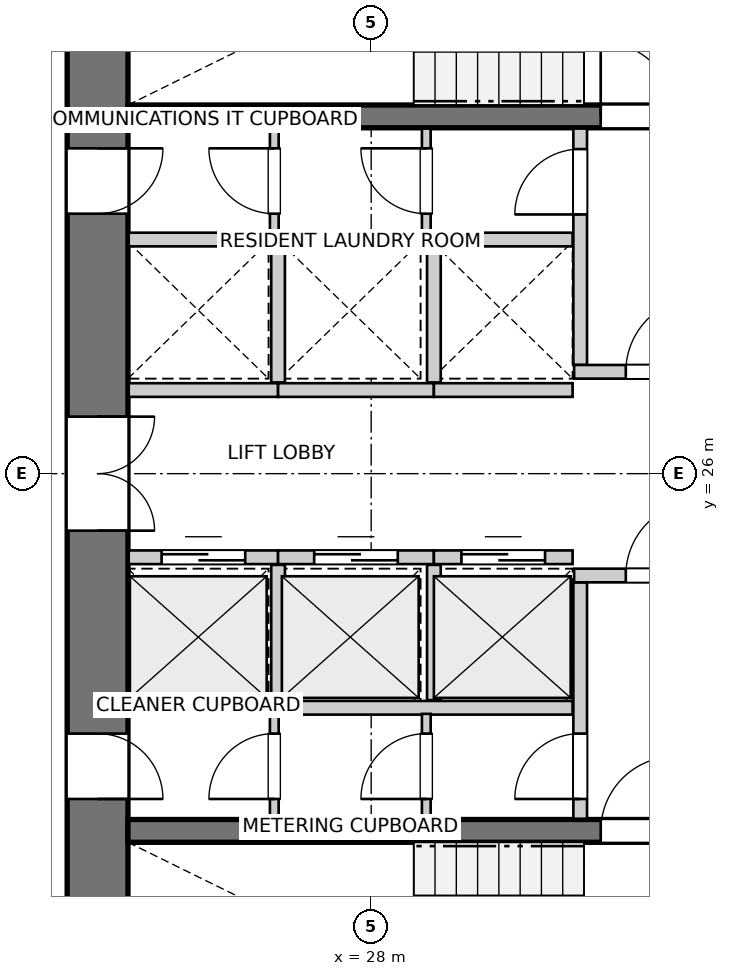
"""IFC4 building model, lengths in metres.
Left out: names, types, materials, properties, quantities, classifications, styles, units other than length and angle.
Written with IfcOpenShell. Run it as: python <this file> out.ifc"""

import sys

from ifc_helpers import new_model, si_unit, direction, frame, frame_2d, origin, place, context, subcontext, project, spatial, rectangle, extrude, source, transform, mapped, element, fill, save


model = new_model("IFC4")
c1 = context("Model", 3, precision=1e-05, world=origin(), true_north=direction((0.0, 1.0)))
c2 = subcontext(c1, "Body", "Model", "MODEL_VIEW")
j1 = project(units=[si_unit("LENGTHUNIT", "METRE"), si_unit("PLANEANGLEUNIT", "RADIAN")], contexts=[c1])
p1 = place(None, origin())
s1 = spatial("IfcSite", under=j1, at=p1, CompositionType="ELEMENT")
p2 = place(p1, origin())
s2 = spatial("IfcBuilding", under=s1, at=p2, CompositionType="ELEMENT")
p3 = place(p2, frame((0.0, 0.0, 62.2)))
s3 = spatial("IfcBuildingStorey", under=s2, at=p3, CompositionType="ELEMENT", Elevation=62.2)
p4 = place(p3, frame((24.4, 33.8, 0.0), z_axis=(0.0, 0.0, 1.0), x_axis=(0.0, -1.0, 0.0)))
e1 = element("IfcWall", 1, at=p4, inside=s3, PredefinedType="SHEAR", context=c2, shape_type="SweptSolid", body=[
    extrude(rectangle(XDim=15.6, YDim=0.8, at=frame_2d((7.8, 0.0))), origin(), (0.0, 0.0, 1.0), 2.9),
])
p5 = place(p4, frame((7.05, 0.0, 0.0)))
e2 = element("IfcOpeningElement", 2, at=p5, cuts=e1, PredefinedType="OPENING", context=c2, shape_type="SweptSolid", body=[
    extrude(rectangle(XDim=1.5, YDim=2.15, at=frame_2d((0.75, 1.075))), frame((0.0, 0.41, 0.0), z_axis=(0.0, -1.0, 0.0), x_axis=(1.0, 0.0, 0.0)), (0.0, 0.0, 1.0), 0.82),
])
p6 = place(p4, frame((3.52, 0.0, 0.0)))
e3 = element("IfcOpeningElement", 3, at=p6, cuts=e1, PredefinedType="OPENING", context=c2, shape_type="SweptSolid", body=[
    extrude(rectangle(XDim=0.86, YDim=2.05, at=frame_2d((0.43, 1.025))), frame((0.0, 0.41, 0.0), z_axis=(0.0, -1.0, 0.0), x_axis=(1.0, 0.0, 0.0)), (0.0, 0.0, 1.0), 0.82),
])
p7 = place(p4, frame((11.22, 0.0, 0.0)))
e4 = element("IfcOpeningElement", 4, at=p7, cuts=e1, PredefinedType="OPENING", context=c2, shape_type="SweptSolid", body=[
    extrude(rectangle(XDim=0.86, YDim=2.05, at=frame_2d((0.43, 1.025))), frame((0.0, 0.41, 0.0), z_axis=(0.0, -1.0, 0.0), x_axis=(1.0, 0.0, 0.0)), (0.0, 0.0, 1.0), 0.82),
])
p8 = place(p3, frame((24.8, 21.3, 0.0), z_axis=(0.0, 0.0, 1.0), x_axis=(1.0, 0.0, 0.0)))
e5 = element("IfcWall", 5, at=p8, inside=s3, PredefinedType="SHEAR", context=c2, shape_type="SweptSolid", body=[
    extrude(rectangle(XDim=11.1, YDim=0.3, at=frame_2d((5.55, 0.0))), origin(), (0.0, 0.0, 1.0), 2.9),
])
p9 = place(p8, frame((6.22, 0.0, 0.0)))
e6 = element("IfcOpeningElement", 6, at=p9, cuts=e5, PredefinedType="OPENING", context=c2, shape_type="SweptSolid", body=[
    extrude(rectangle(XDim=0.98, YDim=2.15, at=frame_2d((0.49, 1.075))), frame((0.0, 0.16, 0.0), z_axis=(0.0, -1.0, 0.0), x_axis=(1.0, 0.0, 0.0)), (0.0, 0.0, 1.0), 0.32),
])
p10 = place(p8, frame((9.15, 0.0, 0.0)))
e7 = element("IfcOpeningElement", 7, at=p10, cuts=e5, PredefinedType="OPENING", context=c2, shape_type="SweptSolid", body=[
    extrude(rectangle(XDim=1.15, YDim=2.15, at=frame_2d((0.575, 1.075))), frame((0.0, 0.16, 0.0), z_axis=(0.0, -1.0, 0.0), x_axis=(1.0, 0.0, 0.0)), (0.0, 0.0, 1.0), 0.32),
])
p11 = place(p3, frame((24.8, 30.7, 0.0), z_axis=(0.0, 0.0, 1.0), x_axis=(1.0, 0.0, 0.0)))
e8 = element("IfcWall", 8, at=p11, inside=s3, PredefinedType="SHEAR", context=c2, shape_type="SweptSolid", body=[
    extrude(rectangle(XDim=11.1, YDim=0.3, at=frame_2d((5.55, 0.0))), origin(), (0.0, 0.0, 1.0), 2.9),
])
p12 = place(p11, frame((6.22, 0.0, 0.0)))
e9 = element("IfcOpeningElement", 9, at=p12, cuts=e8, PredefinedType="OPENING", context=c2, shape_type="SweptSolid", body=[
    extrude(rectangle(XDim=0.98, YDim=2.15, at=frame_2d((0.49, 1.075))), frame((0.0, 0.16, 0.0), z_axis=(0.0, -1.0, 0.0), x_axis=(1.0, 0.0, 0.0)), (0.0, 0.0, 1.0), 0.32),
])
p13 = place(p11, frame((9.15, 0.0, 0.0)))
e10 = element("IfcOpeningElement", 10, at=p13, cuts=e8, PredefinedType="OPENING", context=c2, shape_type="SweptSolid", body=[
    extrude(rectangle(XDim=1.15, YDim=2.15, at=frame_2d((0.575, 1.075))), frame((0.0, 0.16, 0.0), z_axis=(0.0, -1.0, 0.0), x_axis=(1.0, 0.0, 0.0)), (0.0, 0.0, 1.0), 0.32),
])
p14 = place(p3, frame((30.75, 21.46, 0.0), z_axis=(0.0, 0.0, 1.0), x_axis=(0.0, 1.0, 0.0)))
e11 = element("IfcWall", 11, at=p14, inside=s3, PredefinedType="PARTITIONING", context=c2, shape_type="SweptSolid", body=[
    extrude(rectangle(XDim=3.11, YDim=0.18, at=frame_2d((1.555, 0.0))), origin(), (0.0, 0.0, 1.0), 2.9),
])
p15 = place(p14, frame((0.26, 0.0, 0.0)))
e12 = element("IfcOpeningElement", 12, at=p15, cuts=e11, PredefinedType="OPENING", context=c2, shape_type="SweptSolid", body=[
    extrude(rectangle(XDim=0.86, YDim=2.05, at=frame_2d((0.43, 1.025))), frame((0.0, 0.1, 0.0), z_axis=(0.0, -1.0, 0.0), x_axis=(1.0, 0.0, 0.0)), (0.0, 0.0, 1.0), 0.2),
])
p16 = place(p3, frame((30.67, 24.66, 0.0), z_axis=(0.0, 0.0, 1.0), x_axis=(1.0, 0.0, 0.0)))
e13 = element("IfcWall", 13, at=p16, inside=s3, PredefinedType="PARTITIONING", context=c2, shape_type="SweptSolid", body=[
    extrude(rectangle(XDim=5.22, YDim=0.18, at=frame_2d((2.61, 0.0))), origin(), (0.0, 0.0, 1.0), 2.9),
])
p17 = place(p16, frame((0.68, 0.0, 0.0)))
e14 = element("IfcOpeningElement", 14, at=p17, cuts=e13, PredefinedType="OPENING", context=c2, shape_type="SweptSolid", body=[
    extrude(rectangle(XDim=0.98, YDim=2.15, at=frame_2d((0.49, 1.075))), frame((0.0, 0.1, 0.0), z_axis=(0.0, -1.0, 0.0), x_axis=(1.0, 0.0, 0.0)), (0.0, 0.0, 1.0), 0.2),
])
p18 = place(p3, frame((30.75, 27.43, 0.0), z_axis=(0.0, 0.0, 1.0), x_axis=(0.0, 1.0, 0.0)))
e15 = element("IfcWall", 15, at=p18, inside=s3, PredefinedType="PARTITIONING", context=c2, shape_type="SweptSolid", body=[
    extrude(rectangle(XDim=3.11, YDim=0.18, at=frame_2d((1.555, 0.0))), origin(), (0.0, 0.0, 1.0), 2.9),
])
p19 = place(p18, frame((1.98, 0.0, 0.0)))
e16 = element("IfcOpeningElement", 16, at=p19, cuts=e15, PredefinedType="OPENING", context=c2, shape_type="SweptSolid", body=[
    extrude(rectangle(XDim=0.86, YDim=2.05, at=frame_2d((0.43, 1.025))), frame((0.0, 0.1, 0.0), z_axis=(0.0, -1.0, 0.0), x_axis=(1.0, 0.0, 0.0)), (0.0, 0.0, 1.0), 0.2),
])
p20 = place(p3, frame((30.67, 27.34, 0.0), z_axis=(0.0, 0.0, 1.0), x_axis=(1.0, 0.0, 0.0)))
e17 = element("IfcWall", 17, at=p20, inside=s3, PredefinedType="PARTITIONING", context=c2, shape_type="SweptSolid", body=[
    extrude(rectangle(XDim=5.22, YDim=0.18, at=frame_2d((2.61, 0.0))), origin(), (0.0, 0.0, 1.0), 2.9),
])
p21 = place(p20, frame((0.68, 0.0, 0.0)))
e18 = element("IfcOpeningElement", 18, at=p21, cuts=e17, PredefinedType="OPENING", context=c2, shape_type="SweptSolid", body=[
    extrude(rectangle(XDim=0.98, YDim=2.15, at=frame_2d((0.49, 1.075))), frame((0.0, 0.1, 0.0), z_axis=(0.0, -1.0, 0.0), x_axis=(1.0, 0.0, 0.0)), (0.0, 0.0, 1.0), 0.2),
])
p22 = place(p3, frame((24.81, 22.92, 0.0), z_axis=(0.0, 0.0, 1.0), x_axis=(1.0, 0.0, 0.0)))
e19 = element("IfcWall", 19, at=p22, inside=s3, PredefinedType="PARTITIONING", context=c2, shape_type="SweptSolid", body=[
    extrude(rectangle(XDim=5.84, YDim=0.18, at=frame_2d((2.92, 0.0))), origin(), (0.0, 0.0, 1.0), 2.9),
])
p23 = place(p3, frame((24.81, 24.9, 0.0), z_axis=(0.0, 0.0, 1.0), x_axis=(1.0, 0.0, 0.0)))
e20 = element("IfcWall", 20, at=p23, inside=s3, PredefinedType="PARTITIONING", context=c2, shape_type="SweptSolid", body=[
    extrude(rectangle(XDim=1.965, YDim=0.18, at=frame_2d((0.982, 0.0))), origin(), (0.0, 0.0, 1.0), 2.9),
])
p24 = place(p23, frame((0.433, 0.0, 0.0)))
e21 = element("IfcOpeningElement", 21, at=p24, cuts=e20, PredefinedType="OPENING", context=c2, shape_type="SweptSolid", body=[
    extrude(rectangle(XDim=1.1, YDim=2.15, at=frame_2d((0.55, 1.075))), frame((0.0, 0.1, 0.0), z_axis=(0.0, -1.0, 0.0), x_axis=(1.0, 0.0, 0.0)), (0.0, 0.0, 1.0), 0.2),
])
p25 = place(p3, frame((26.775, 24.9, 0.0), z_axis=(0.0, 0.0, 1.0), x_axis=(1.0, 0.0, 0.0)))
e22 = element("IfcWall", 22, at=p25, inside=s3, PredefinedType="PARTITIONING", context=c2, shape_type="SweptSolid", body=[
    extrude(rectangle(XDim=2.05, YDim=0.18, at=frame_2d((1.025, 0.0))), origin(), (0.0, 0.0, 1.0), 2.9),
])
p26 = place(p25, frame((0.475, 0.0, 0.0)))
e23 = element("IfcOpeningElement", 23, at=p26, cuts=e22, PredefinedType="OPENING", context=c2, shape_type="SweptSolid", body=[
    extrude(rectangle(XDim=1.1, YDim=2.15, at=frame_2d((0.55, 1.075))), frame((0.0, 0.1, 0.0), z_axis=(0.0, -1.0, 0.0), x_axis=(1.0, 0.0, 0.0)), (0.0, 0.0, 1.0), 0.2),
])
p27 = place(p3, frame((26.775, 23.02, 0.0), z_axis=(0.0, 0.0, 1.0), x_axis=(0.0, 1.0, 0.0)))
e24 = element("IfcWall", 24, at=p27, inside=s3, PredefinedType="PARTITIONING", context=c2, shape_type="SweptSolid", body=[
    extrude(rectangle(XDim=1.78, YDim=0.18, at=frame_2d((0.89, 0.0))), origin(), (0.0, 0.0, 1.0), 2.9),
])
p28 = place(p3, frame((28.825, 24.9, 0.0), z_axis=(0.0, 0.0, 1.0), x_axis=(1.0, 0.0, 0.0)))
e25 = element("IfcWall", 25, at=p28, inside=s3, PredefinedType="PARTITIONING", context=c2, shape_type="SweptSolid", body=[
    extrude(rectangle(XDim=1.825, YDim=0.18, at=frame_2d((0.913, 0.0))), origin(), (0.0, 0.0, 1.0), 2.9),
])
p29 = place(p28, frame((0.363, 0.0, 0.0)))
e26 = element("IfcOpeningElement", 26, at=p29, cuts=e25, PredefinedType="OPENING", context=c2, shape_type="SweptSolid", body=[
    extrude(rectangle(XDim=1.1, YDim=2.15, at=frame_2d((0.55, 1.075))), frame((0.0, 0.1, 0.0), z_axis=(0.0, -1.0, 0.0), x_axis=(1.0, 0.0, 0.0)), (0.0, 0.0, 1.0), 0.2),
])
p30 = place(p3, frame((28.825, 23.02, 0.0), z_axis=(0.0, 0.0, 1.0), x_axis=(0.0, 1.0, 0.0)))
e27 = element("IfcWall", 27, at=p30, inside=s3, PredefinedType="PARTITIONING", context=c2, shape_type="SweptSolid", body=[
    extrude(rectangle(XDim=1.78, YDim=0.18, at=frame_2d((0.89, 0.0))), origin(), (0.0, 0.0, 1.0), 2.9),
])
p31 = place(p3, frame((24.81, 29.08, 0.0), z_axis=(0.0, 0.0, 1.0), x_axis=(1.0, 0.0, 0.0)))
e28 = element("IfcWall", 28, at=p31, inside=s3, PredefinedType="PARTITIONING", context=c2, shape_type="SweptSolid", body=[
    extrude(rectangle(XDim=5.84, YDim=0.18, at=frame_2d((2.92, 0.0))), origin(), (0.0, 0.0, 1.0), 2.9),
])
p32 = place(p3, frame((24.81, 27.1, 0.0), z_axis=(0.0, 0.0, 1.0), x_axis=(1.0, 0.0, 0.0)))
e29 = element("IfcWall", 29, at=p32, inside=s3, PredefinedType="PARTITIONING", context=c2, shape_type="SweptSolid", body=[
    extrude(rectangle(XDim=1.965, YDim=0.18, at=frame_2d((0.982, 0.0))), origin(), (0.0, 0.0, 1.0), 2.9),
])
p33 = place(p3, frame((26.775, 27.1, 0.0), z_axis=(0.0, 0.0, 1.0), x_axis=(1.0, 0.0, 0.0)))
e30 = element("IfcWall", 30, at=p33, inside=s3, PredefinedType="PARTITIONING", context=c2, shape_type="SweptSolid", body=[
    extrude(rectangle(XDim=2.05, YDim=0.18, at=frame_2d((1.025, 0.0))), origin(), (0.0, 0.0, 1.0), 2.9),
])
p34 = place(p3, frame((26.775, 27.2, 0.0), z_axis=(0.0, 0.0, 1.0), x_axis=(0.0, 1.0, 0.0)))
e31 = element("IfcWall", 31, at=p34, inside=s3, PredefinedType="PARTITIONING", context=c2, shape_type="SweptSolid", body=[
    extrude(rectangle(XDim=1.78, YDim=0.18, at=frame_2d((0.89, 0.0))), origin(), (0.0, 0.0, 1.0), 2.9),
])
p35 = place(p3, frame((28.825, 27.1, 0.0), z_axis=(0.0, 0.0, 1.0), x_axis=(1.0, 0.0, 0.0)))
e32 = element("IfcWall", 32, at=p35, inside=s3, PredefinedType="PARTITIONING", context=c2, shape_type="SweptSolid", body=[
    extrude(rectangle(XDim=1.825, YDim=0.18, at=frame_2d((0.913, 0.0))), origin(), (0.0, 0.0, 1.0), 2.9),
])
p36 = place(p3, frame((28.825, 27.2, 0.0), z_axis=(0.0, 0.0, 1.0), x_axis=(0.0, 1.0, 0.0)))
e33 = element("IfcWall", 33, at=p36, inside=s3, PredefinedType="PARTITIONING", context=c2, shape_type="SweptSolid", body=[
    extrude(rectangle(XDim=1.78, YDim=0.18, at=frame_2d((0.89, 0.0))), origin(), (0.0, 0.0, 1.0), 2.9),
])
p37 = place(p3, frame((26.725, 21.46, 0.0), z_axis=(0.0, 0.0, 1.0), x_axis=(0.0, 1.0, 0.0)))
e34 = element("IfcWall", 34, at=p37, inside=s3, PredefinedType="PARTITIONING", context=c2, shape_type="SweptSolid", body=[
    extrude(rectangle(XDim=1.38, YDim=0.115, at=frame_2d((0.69, 0.0))), origin(), (0.0, 0.0, 1.0), 2.9),
])
p38 = place(p37, frame((0.26, 0.0, 0.0)))
e35 = element("IfcOpeningElement", 35, at=p38, cuts=e34, PredefinedType="OPENING", context=c2, shape_type="SweptSolid", body=[
    extrude(rectangle(XDim=0.86, YDim=2.05, at=frame_2d((0.43, 1.025))), frame((0.0, 0.067, 0.0), z_axis=(0.0, -1.0, 0.0), x_axis=(1.0, 0.0, 0.0)), (0.0, 0.0, 1.0), 0.135),
])
p39 = place(p3, frame((26.725, 29.16, 0.0), z_axis=(0.0, 0.0, 1.0), x_axis=(0.0, 1.0, 0.0)))
e36 = element("IfcWall", 36, at=p39, inside=s3, PredefinedType="PARTITIONING", context=c2, shape_type="SweptSolid", body=[
    extrude(rectangle(XDim=1.38, YDim=0.115, at=frame_2d((0.69, 0.0))), origin(), (0.0, 0.0, 1.0), 2.9),
])
p40 = place(p39, frame((0.26, 0.0, 0.0)))
e37 = element("IfcOpeningElement", 37, at=p40, cuts=e36, PredefinedType="OPENING", context=c2, shape_type="SweptSolid", body=[
    extrude(rectangle(XDim=0.86, YDim=2.05, at=frame_2d((0.43, 1.025))), frame((0.0, 0.067, 0.0), z_axis=(0.0, -1.0, 0.0), x_axis=(1.0, 0.0, 0.0)), (0.0, 0.0, 1.0), 0.135),
])
p41 = place(p3, frame((28.725, 21.46, 0.0), z_axis=(0.0, 0.0, 1.0), x_axis=(0.0, 1.0, 0.0)))
e38 = element("IfcWall", 38, at=p41, inside=s3, PredefinedType="PARTITIONING", context=c2, shape_type="SweptSolid", body=[
    extrude(rectangle(XDim=1.38, YDim=0.115, at=frame_2d((0.69, 0.0))), origin(), (0.0, 0.0, 1.0), 2.9),
])
p42 = place(p41, frame((0.26, 0.0, 0.0)))
e39 = element("IfcOpeningElement", 39, at=p42, cuts=e38, PredefinedType="OPENING", context=c2, shape_type="SweptSolid", body=[
    extrude(rectangle(XDim=0.86, YDim=2.05, at=frame_2d((0.43, 1.025))), frame((0.0, 0.067, 0.0), z_axis=(0.0, -1.0, 0.0), x_axis=(1.0, 0.0, 0.0)), (0.0, 0.0, 1.0), 0.135),
])
p43 = place(p3, frame((28.725, 29.16, 0.0), z_axis=(0.0, 0.0, 1.0), x_axis=(0.0, 1.0, 0.0)))
e40 = element("IfcWall", 40, at=p43, inside=s3, PredefinedType="PARTITIONING", context=c2, shape_type="SweptSolid", body=[
    extrude(rectangle(XDim=1.38, YDim=0.115, at=frame_2d((0.69, 0.0))), origin(), (0.0, 0.0, 1.0), 2.9),
])
p44 = place(p43, frame((0.26, 0.0, 0.0)))
e41 = element("IfcOpeningElement", 41, at=p44, cuts=e40, PredefinedType="OPENING", context=c2, shape_type="SweptSolid", body=[
    extrude(rectangle(XDim=0.86, YDim=2.05, at=frame_2d((0.43, 1.025))), frame((0.0, 0.067, 0.0), z_axis=(0.0, -1.0, 0.0), x_axis=(1.0, 0.0, 0.0)), (0.0, 0.0, 1.0), 0.135),
])
m1 = source(origin(), c2, "Body", "SweptSolid", [
    extrude(rectangle(XDim=0.98, YDim=2.15, at=frame_2d((0.49, 1.075))), frame((0.0, 0.025, 0.0), z_axis=(0.0, -1.0, 0.0), x_axis=(1.0, 0.0, 0.0)), (0.0, 0.0, 1.0), 0.05),
])
p45 = place(p9, origin())
e42 = element("IfcDoor", 42, at=p45, inside=s3, OperationType="SINGLE_SWING_RIGHT", PredefinedType="DOOR", context=c2, shape_type="MappedRepresentation", body=[
    mapped(m1, transform((0.0, 0.0, 0.0), x_axis=(1.0, 0.0, 0.0), y_axis=(0.0, 1.0, 0.0), z_axis=(0.0, 0.0, 1.0), scale=1.0)),
])
fill(e6, e42)
p46 = place(p12, origin())
e43 = element("IfcDoor", 43, at=p46, inside=s3, OperationType="SINGLE_SWING_LEFT", PredefinedType="DOOR", context=c2, shape_type="MappedRepresentation", body=[
    mapped(m1, transform((0.0, 0.0, 0.0), x_axis=(1.0, 0.0, 0.0), y_axis=(0.0, 1.0, 0.0), z_axis=(0.0, 0.0, 1.0), scale=1.0)),
])
fill(e9, e43)
m2 = source(origin(), c2, "Body", "SweptSolid", [
    extrude(rectangle(XDim=1.5, YDim=2.15, at=frame_2d((0.75, 1.075))), frame((0.0, 0.025, 0.0), z_axis=(0.0, -1.0, 0.0), x_axis=(1.0, 0.0, 0.0)), (0.0, 0.0, 1.0), 0.05),
])
p47 = place(p5, origin())
e44 = element("IfcDoor", 44, at=p47, inside=s3, OperationType="DOUBLE_DOOR_SINGLE_SWING", PredefinedType="DOOR", context=c2, shape_type="MappedRepresentation", body=[
    mapped(m2, transform((0.0, 0.0, 0.0), x_axis=(1.0, 0.0, 0.0), y_axis=(0.0, 1.0, 0.0), z_axis=(0.0, 0.0, 1.0), scale=1.0)),
])
fill(e2, e44)
m3 = source(origin(), c2, "Body", "SweptSolid", [
    extrude(rectangle(XDim=0.86, YDim=2.05, at=frame_2d((0.43, 1.025))), frame((0.0, 0.025, 0.0), z_axis=(0.0, -1.0, 0.0), x_axis=(1.0, 0.0, 0.0)), (0.0, 0.0, 1.0), 0.05),
])
p48 = place(p6, origin())
e45 = element("IfcDoor", 45, at=p48, inside=s3, OperationType="SINGLE_SWING_LEFT", PredefinedType="DOOR", context=c2, shape_type="MappedRepresentation", body=[
    mapped(m3, transform((0.0, 0.0, 0.0), x_axis=(1.0, 0.0, 0.0), y_axis=(0.0, 1.0, 0.0), z_axis=(0.0, 0.0, 1.0), scale=1.0)),
])
fill(e3, e45)
p49 = place(p7, origin())
e46 = element("IfcDoor", 46, at=p49, inside=s3, OperationType="SINGLE_SWING_RIGHT", PredefinedType="DOOR", context=c2, shape_type="MappedRepresentation", body=[
    mapped(m3, transform((0.0, 0.0, 0.0), x_axis=(1.0, 0.0, 0.0), y_axis=(0.0, 1.0, 0.0), z_axis=(0.0, 0.0, 1.0), scale=1.0)),
])
fill(e4, e46)
p50 = place(p15, origin())
e47 = element("IfcDoor", 47, at=p50, inside=s3, OperationType="SINGLE_SWING_LEFT", PredefinedType="DOOR", context=c2, shape_type="MappedRepresentation", body=[
    mapped(m3, transform((0.0, 0.0, 0.0), x_axis=(1.0, 0.0, 0.0), y_axis=(0.0, 1.0, 0.0), z_axis=(0.0, 0.0, 1.0), scale=1.0)),
])
fill(e12, e47)
p51 = place(p17, origin())
e48 = element("IfcDoor", 48, at=p51, inside=s3, OperationType="SINGLE_SWING_RIGHT", PredefinedType="DOOR", context=c2, shape_type="MappedRepresentation", body=[
    mapped(m1, transform((0.0, 0.0, 0.0), x_axis=(1.0, 0.0, 0.0), y_axis=(0.0, 1.0, 0.0), z_axis=(0.0, 0.0, 1.0), scale=1.0)),
])
fill(e14, e48)
p52 = place(p19, origin())
e49 = element("IfcDoor", 49, at=p52, inside=s3, OperationType="SINGLE_SWING_LEFT", PredefinedType="DOOR", context=c2, shape_type="MappedRepresentation", body=[
    mapped(m3, transform((0.0, 0.0, 0.0), x_axis=(1.0, 0.0, 0.0), y_axis=(0.0, 1.0, 0.0), z_axis=(0.0, 0.0, 1.0), scale=1.0)),
])
fill(e16, e49)
p53 = place(p21, origin())
e50 = element("IfcDoor", 50, at=p53, inside=s3, OperationType="SINGLE_SWING_RIGHT", PredefinedType="DOOR", context=c2, shape_type="MappedRepresentation", body=[
    mapped(m1, transform((0.0, 0.0, 0.0), x_axis=(1.0, 0.0, 0.0), y_axis=(0.0, 1.0, 0.0), z_axis=(0.0, 0.0, 1.0), scale=1.0)),
])
fill(e18, e50)
m4 = source(origin(), c2, "Body", "SweptSolid", [
    extrude(rectangle(XDim=1.1, YDim=2.15, at=frame_2d((0.55, 1.075))), frame((0.0, 0.025, 0.0), z_axis=(0.0, -1.0, 0.0), x_axis=(1.0, 0.0, 0.0)), (0.0, 0.0, 1.0), 0.05),
])
p54 = place(p24, origin())
e51 = element("IfcDoor", 51, at=p54, inside=s3, OperationType="DOUBLE_DOOR_SLIDING", PredefinedType="DOOR", context=c2, shape_type="MappedRepresentation", body=[
    mapped(m4, transform((0.0, 0.0, 0.0), x_axis=(1.0, 0.0, 0.0), y_axis=(0.0, 1.0, 0.0), z_axis=(0.0, 0.0, 1.0), scale=1.0)),
])
fill(e21, e51)
p55 = place(p26, origin())
e52 = element("IfcDoor", 52, at=p55, inside=s3, OperationType="DOUBLE_DOOR_SLIDING", PredefinedType="DOOR", context=c2, shape_type="MappedRepresentation", body=[
    mapped(m4, transform((0.0, 0.0, 0.0), x_axis=(1.0, 0.0, 0.0), y_axis=(0.0, 1.0, 0.0), z_axis=(0.0, 0.0, 1.0), scale=1.0)),
])
fill(e23, e52)
p56 = place(p29, origin())
e53 = element("IfcDoor", 53, at=p56, inside=s3, OperationType="DOUBLE_DOOR_SLIDING", PredefinedType="DOOR", context=c2, shape_type="MappedRepresentation", body=[
    mapped(m4, transform((0.0, 0.0, 0.0), x_axis=(1.0, 0.0, 0.0), y_axis=(0.0, 1.0, 0.0), z_axis=(0.0, 0.0, 1.0), scale=1.0)),
])
fill(e26, e53)
p57 = place(p38, origin())
e54 = element("IfcDoor", 54, at=p57, inside=s3, OperationType="SINGLE_SWING_LEFT", PredefinedType="DOOR", context=c2, shape_type="MappedRepresentation", body=[
    mapped(m3, transform((0.0, 0.0, 0.0), x_axis=(1.0, 0.0, 0.0), y_axis=(0.0, 1.0, 0.0), z_axis=(0.0, 0.0, 1.0), scale=1.0)),
])
fill(e35, e54)
p58 = place(p40, origin())
e55 = element("IfcDoor", 55, at=p58, inside=s3, OperationType="SINGLE_SWING_RIGHT", PredefinedType="DOOR", context=c2, shape_type="MappedRepresentation", body=[
    mapped(m3, transform((0.0, 0.0, 0.0), x_axis=(1.0, 0.0, 0.0), y_axis=(0.0, 1.0, 0.0), z_axis=(0.0, 0.0, 1.0), scale=1.0)),
])
fill(e37, e55)
p59 = place(p42, origin())
e56 = element("IfcDoor", 56, at=p59, inside=s3, OperationType="SINGLE_SWING_LEFT", PredefinedType="DOOR", context=c2, shape_type="MappedRepresentation", body=[
    mapped(m3, transform((0.0, 0.0, 0.0), x_axis=(1.0, 0.0, 0.0), y_axis=(0.0, 1.0, 0.0), z_axis=(0.0, 0.0, 1.0), scale=1.0)),
])
fill(e39, e56)
p60 = place(p44, origin())
e57 = element("IfcDoor", 57, at=p60, inside=s3, OperationType="SINGLE_SWING_RIGHT", PredefinedType="DOOR", context=c2, shape_type="MappedRepresentation", body=[
    mapped(m3, transform((0.0, 0.0, 0.0), x_axis=(1.0, 0.0, 0.0), y_axis=(0.0, 1.0, 0.0), z_axis=(0.0, 0.0, 1.0), scale=1.0)),
])
fill(e41, e57)
save(model, sys.argv[1])
